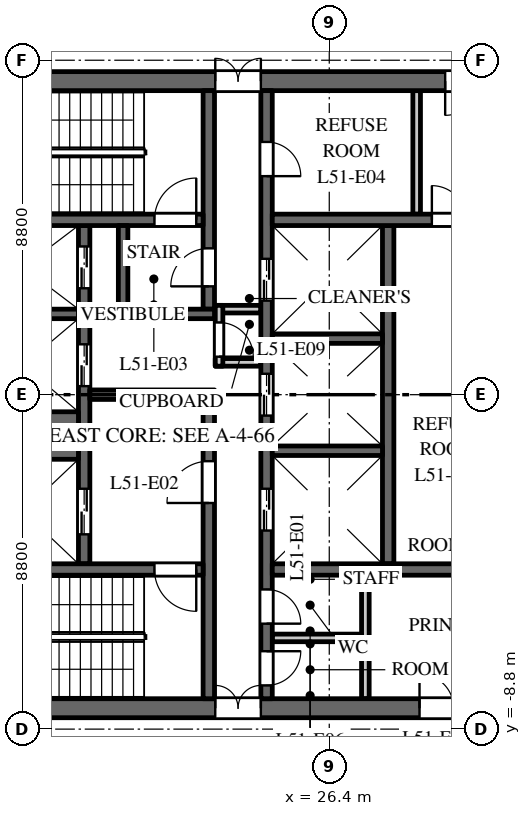
"""IFC4 building model, lengths in metres.
Left out: names, types, materials, properties, quantities, classifications, styles, units other than length and angle.
Written with IfcOpenShell. Run it as: python <this file> out.ifc"""

import sys

from ifc_helpers import new_model, si_unit, direction, frame, frame_2d, origin, place, context, subcontext, project, spatial, rectangle, extrude, element, fill, save


model = new_model("IFC4")
c1 = context("Model", 3, precision=1e-05, world=origin(), true_north=direction((0.0, 1.0)))
c2 = subcontext(c1, "Body", "Model", "MODEL_VIEW")
j1 = project(units=[si_unit("LENGTHUNIT", "METRE"), si_unit("PLANEANGLEUNIT", "RADIAN")], contexts=[c1])
p1 = place(None, origin())
s1 = spatial("IfcSite", under=j1, at=p1, CompositionType="ELEMENT")
p2 = place(p1, origin())
s2 = spatial("IfcBuilding", under=s1, at=p2, CompositionType="ELEMENT")
p3 = place(p2, frame((0.0, 0.0, 245.5)))
s3 = spatial("IfcBuildingStorey", under=s2, at=p3, CompositionType="ELEMENT", Elevation=245.5)
p4 = place(p3, frame((16.5, 8.25, 0.0), z_axis=(0.0, 0.0, 1.0), x_axis=(1.0, 0.0, 0.0)))
e1 = element("IfcWall", 1, at=p4, inside=s3, PredefinedType="SHEAR", context=c2, shape_type="SweptSolid", body=[
    extrude(rectangle(XDim=15.0, YDim=0.5, at=frame_2d((7.5, 0.0))), origin(), (0.0, 0.0, 1.0), 3.7),
])
p5 = place(p4, frame((6.9, 0.0, 0.0)))
e2 = element("IfcOpeningElement", 2, at=p5, cuts=e1, PredefinedType="OPENING", context=c2, shape_type="SweptSolid", body=[
    extrude(rectangle(XDim=1.2, YDim=2.1, at=frame_2d((0.6, 1.05))), frame((0.0, 0.26, 0.0), z_axis=(0.0, -1.0, 0.0), x_axis=(1.0, 0.0, 0.0)), (0.0, 0.0, 1.0), 0.52),
])
p6 = place(p4, frame((12.95, 0.0, 0.0)))
e3 = element("IfcOpeningElement", 3, at=p6, cuts=e1, PredefinedType="OPENING", context=c2, shape_type="SweptSolid", body=[
    extrude(rectangle(XDim=0.9, YDim=2.1, at=frame_2d((0.45, 1.05))), frame((0.0, 0.26, 0.0), z_axis=(0.0, -1.0, 0.0), x_axis=(1.0, 0.0, 0.0)), (0.0, 0.0, 1.0), 0.52),
])
p7 = place(p3, frame((16.5, -8.25, 0.0), z_axis=(0.0, 0.0, 1.0), x_axis=(1.0, 0.0, 0.0)))
e4 = element("IfcWall", 4, at=p7, inside=s3, PredefinedType="SHEAR", context=c2, shape_type="SweptSolid", body=[
    extrude(rectangle(XDim=15.0, YDim=0.5, at=frame_2d((7.5, 0.0))), origin(), (0.0, 0.0, 1.0), 3.7),
])
p8 = place(p7, frame((6.9, 0.0, 0.0)))
e5 = element("IfcOpeningElement", 5, at=p8, cuts=e4, PredefinedType="OPENING", context=c2, shape_type="SweptSolid", body=[
    extrude(rectangle(XDim=1.2, YDim=2.1, at=frame_2d((0.6, 1.05))), frame((0.0, 0.26, 0.0), z_axis=(0.0, -1.0, 0.0), x_axis=(1.0, 0.0, 0.0)), (0.0, 0.0, 1.0), 0.52),
])
p9 = place(p7, frame((12.275, 0.0, 0.0)))
e6 = element("IfcOpeningElement", 6, at=p9, cuts=e4, PredefinedType="OPENING", context=c2, shape_type="SweptSolid", body=[
    extrude(rectangle(XDim=0.9, YDim=2.1, at=frame_2d((0.45, 1.05))), frame((0.0, 0.26, 0.0), z_axis=(0.0, -1.0, 0.0), x_axis=(1.0, 0.0, 0.0)), (0.0, 0.0, 1.0), 0.52),
])
p10 = place(p3, frame((27.95, -4.45, 0.0), z_axis=(0.0, 0.0, 1.0), x_axis=(0.0, 1.0, 0.0)))
e7 = element("IfcWall", 7, at=p10, inside=s3, PredefinedType="SHEAR", context=c2, shape_type="SweptSolid", body=[
    extrude(rectangle(XDim=8.9, YDim=0.3, at=frame_2d((4.45, 0.0))), origin(), (0.0, 0.0, 1.0), 3.7),
])
p11 = place(p3, frame((19.95, -4.45, 0.0), z_axis=(0.0, 0.0, 1.0), x_axis=(0.0, 1.0, 0.0)))
e8 = element("IfcWall", 8, at=p11, inside=s3, PredefinedType="SHEAR", context=c2, shape_type="SweptSolid", body=[
    extrude(rectangle(XDim=8.9, YDim=0.3, at=frame_2d((4.45, 0.0))), origin(), (0.0, 0.0, 1.0), 3.7),
])
p12 = place(p11, frame((0.775, 0.0, 0.0)))
e9 = element("IfcOpeningElement", 9, at=p12, cuts=e8, PredefinedType="OPENING", context=c2, shape_type="SweptSolid", body=[
    extrude(rectangle(XDim=1.2, YDim=2.1, at=frame_2d((0.6, 1.05))), frame((0.0, 0.16, 0.0), z_axis=(0.0, -1.0, 0.0), x_axis=(1.0, 0.0, 0.0)), (0.0, 0.0, 1.0), 0.32),
])
p13 = place(p11, frame((4.675, 0.0, 0.0)))
e10 = element("IfcOpeningElement", 10, at=p13, cuts=e8, PredefinedType="OPENING", context=c2, shape_type="SweptSolid", body=[
    extrude(rectangle(XDim=1.1, YDim=2.1, at=frame_2d((0.55, 1.05))), frame((0.0, 0.16, 0.0), z_axis=(0.0, -1.0, 0.0), x_axis=(1.0, 0.0, 0.0)), (0.0, 0.0, 1.0), 0.32),
])
p14 = place(p11, frame((7.25, 0.0, 0.0)))
e11 = element("IfcOpeningElement", 11, at=p14, cuts=e8, PredefinedType="OPENING", context=c2, shape_type="SweptSolid", body=[
    extrude(rectangle(XDim=1.1, YDim=2.1, at=frame_2d((0.55, 1.05))), frame((0.0, 0.16, 0.0), z_axis=(0.0, -1.0, 0.0), x_axis=(1.0, 0.0, 0.0)), (0.0, 0.0, 1.0), 0.32),
])
p15 = place(p3, frame((24.75, -8.0, 0.0), z_axis=(0.0, 0.0, 1.0), x_axis=(0.0, 1.0, 0.0)))
e12 = element("IfcWall", 12, at=p15, inside=s3, PredefinedType="SHEAR", context=c2, shape_type="SweptSolid", body=[
    extrude(rectangle(XDim=16.0, YDim=0.3, at=frame_2d((8.0, 0.0))), origin(), (0.0, 0.0, 1.0), 3.7),
])
p16 = place(p15, frame((4.425, 0.0, 0.0)))
e13 = element("IfcOpeningElement", 13, at=p16, cuts=e12, PredefinedType="OPENING", context=c2, shape_type="SweptSolid", body=[
    extrude(rectangle(XDim=1.1, YDim=2.1, at=frame_2d((0.55, 1.05))), frame((0.0, 0.16, 0.0), z_axis=(0.0, -1.0, 0.0), x_axis=(1.0, 0.0, 0.0)), (0.0, 0.0, 1.0), 0.32),
])
p17 = place(p15, frame((7.45, 0.0, 0.0)))
e14 = element("IfcOpeningElement", 14, at=p17, cuts=e12, PredefinedType="OPENING", context=c2, shape_type="SweptSolid", body=[
    extrude(rectangle(XDim=1.1, YDim=2.1, at=frame_2d((0.55, 1.05))), frame((0.0, 0.16, 0.0), z_axis=(0.0, -1.0, 0.0), x_axis=(1.0, 0.0, 0.0)), (0.0, 0.0, 1.0), 0.32),
])
p18 = place(p15, frame((10.475, 0.0, 0.0)))
e15 = element("IfcOpeningElement", 15, at=p18, cuts=e12, PredefinedType="OPENING", context=c2, shape_type="SweptSolid", body=[
    extrude(rectangle(XDim=1.1, YDim=2.1, at=frame_2d((0.55, 1.05))), frame((0.0, 0.16, 0.0), z_axis=(0.0, -1.0, 0.0), x_axis=(1.0, 0.0, 0.0)), (0.0, 0.0, 1.0), 0.32),
])
p19 = place(p15, frame((13.75, 0.0, 0.0)))
e16 = element("IfcOpeningElement", 16, at=p19, cuts=e12, PredefinedType="OPENING", context=c2, shape_type="SweptSolid", body=[
    extrude(rectangle(XDim=0.9, YDim=2.1, at=frame_2d((0.45, 1.05))), frame((0.0, 0.16, 0.0), z_axis=(0.0, -1.0, 0.0), x_axis=(1.0, 0.0, 0.0)), (0.0, 0.0, 1.0), 0.32),
])
p20 = place(p15, frame((1.975, 0.0, 0.0)))
e17 = element("IfcOpeningElement", 17, at=p20, cuts=e12, PredefinedType="OPENING", context=c2, shape_type="SweptSolid", body=[
    extrude(rectangle(XDim=0.9, YDim=2.1, at=frame_2d((0.45, 1.05))), frame((0.0, 0.16, 0.0), z_axis=(0.0, -1.0, 0.0), x_axis=(1.0, 0.0, 0.0)), (0.0, 0.0, 1.0), 0.32),
])
p21 = place(p15, frame((0.35, 0.0, 0.0)))
e18 = element("IfcOpeningElement", 18, at=p21, cuts=e12, PredefinedType="OPENING", context=c2, shape_type="SweptSolid", body=[
    extrude(rectangle(XDim=0.9, YDim=2.1, at=frame_2d((0.45, 1.05))), frame((0.0, 0.16, 0.0), z_axis=(0.0, -1.0, 0.0), x_axis=(1.0, 0.0, 0.0)), (0.0, 0.0, 1.0), 0.32),
])
p22 = place(p3, frame((20.1, 0.0, 0.0), z_axis=(0.0, 0.0, 1.0), x_axis=(1.0, 0.0, 0.0)))
e19 = element("IfcWall", 19, at=p22, inside=s3, PredefinedType="SHEAR", context=c2, shape_type="SweptSolid", body=[
    extrude(rectangle(XDim=3.28, YDim=0.25, at=frame_2d((1.64, 0.0))), origin(), (0.0, 0.0, 1.0), 3.7),
])
for number, where, z_axis, x_axis in (
    (20, (23.4, 0.85, 0.0), (0.0, 0.0, 1.0), (1.0, 0.0, 0.0)),
    (21, (23.4, 2.25, 0.0), (0.0, 0.0, 1.0), (1.0, 0.0, 0.0)),
):
    element("IfcWall", number, at=place(p3, frame(where, z_axis=z_axis, x_axis=x_axis)), inside=s3, PredefinedType="PARTITIONING", context=c2, shape_type="SweptSolid", body=[
        extrude(rectangle(XDim=1.2, YDim=0.2, at=frame_2d((0.6, 0.0))), origin(), (0.0, 0.0, 1.0), 3.7),
    ])
p23 = place(p3, frame((23.5, 0.75, 0.0), z_axis=(0.0, 0.0, 1.0), x_axis=(0.0, 1.0, 0.0)))
e22 = element("IfcWall", 22, at=p23, inside=s3, PredefinedType="PARTITIONING", context=c2, shape_type="SweptSolid", body=[
    extrude(rectangle(XDim=1.6, YDim=0.2, at=frame_2d((0.8, 0.0))), origin(), (0.0, 0.0, 1.0), 3.7),
])
p24 = place(p23, frame((0.25, 0.0, 0.0)))
e23 = element("IfcOpeningElement", 23, at=p24, cuts=e22, PredefinedType="OPENING", context=c2, shape_type="SweptSolid", body=[
    extrude(rectangle(XDim=0.9, YDim=2.1, at=frame_2d((0.45, 1.05))), frame((0.0, 0.11, 0.0), z_axis=(0.0, -1.0, 0.0), x_axis=(1.0, 0.0, 0.0)), (0.0, 0.0, 1.0), 0.22),
])
p25 = place(p3, frame((24.9, 4.6, 0.0), z_axis=(0.0, 0.0, 1.0), x_axis=(1.0, 0.0, 0.0)))
e24 = element("IfcWall", 24, at=p25, inside=s3, PredefinedType="SHEAR", context=c2, shape_type="SweptSolid", body=[
    extrude(rectangle(XDim=6.1, YDim=0.3, at=frame_2d((3.05, 0.0))), origin(), (0.0, 0.0, 1.0), 3.7),
])
p26 = place(p25, frame((4.2, 0.0, 0.0)))
e25 = element("IfcOpeningElement", 25, at=p26, cuts=e24, PredefinedType="OPENING", context=c2, shape_type="SweptSolid", body=[
    extrude(rectangle(XDim=0.9, YDim=2.1, at=frame_2d((0.45, 1.05))), frame((0.0, 0.16, 0.0), z_axis=(0.0, -1.0, 0.0), x_axis=(1.0, 0.0, 0.0)), (0.0, 0.0, 1.0), 0.32),
])
for number, where, z_axis, x_axis in (
    (26, (28.7, 4.75, 0.0), (0.0, 0.0, 1.0), (0.0, 1.0, 0.0)),
    (27, (27.35, -8.0, 0.0), (0.0, 0.0, 1.0), (0.0, 1.0, 0.0)),
):
    element("IfcWall", number, at=place(p3, frame(where, z_axis=z_axis, x_axis=x_axis)), inside=s3, PredefinedType="PARTITIONING", context=c2, shape_type="SweptSolid", body=[
        extrude(rectangle(XDim=3.25, YDim=0.2, at=frame_2d((1.625, 0.0))), origin(), (0.0, 0.0, 1.0), 3.7),
    ])
p27 = place(p3, frame((24.9, -6.4, 0.0), z_axis=(0.0, 0.0, 1.0), x_axis=(1.0, 0.0, 0.0)))
e28 = element("IfcWall", 28, at=p27, inside=s3, PredefinedType="PARTITIONING", context=c2, shape_type="SweptSolid", body=[
    extrude(rectangle(XDim=2.35, YDim=0.2, at=frame_2d((1.175, 0.0))), origin(), (0.0, 0.0, 1.0), 3.7),
])
p28 = place(p3, frame((24.9, -4.6, 0.0), z_axis=(0.0, 0.0, 1.0), x_axis=(1.0, 0.0, 0.0)))
e29 = element("IfcWall", 29, at=p28, inside=s3, PredefinedType="SHEAR", context=c2, shape_type="SweptSolid", body=[
    extrude(rectangle(XDim=6.1, YDim=0.3, at=frame_2d((3.05, 0.0))), origin(), (0.0, 0.0, 1.0), 3.7),
])
p29 = place(p3, frame((16.9, -1.075, 0.0), z_axis=(0.0, 0.0, 1.0), x_axis=(1.0, 0.0, 0.0)))
e30 = element("IfcWall", 30, at=p29, inside=s3, PredefinedType="SHEAR", context=c2, shape_type="SweptSolid", body=[
    extrude(rectangle(XDim=2.9, YDim=1.25, at=frame_2d((1.45, 0.0))), origin(), (0.0, 0.0, 1.0), 3.7),
])
for number, where, z_axis, x_axis in (
    (31, (16.9, 2.125, 0.0), (0.0, 0.0, 1.0), (1.0, 0.0, 0.0)),
    (32, (24.9, -1.475, 0.0), (0.0, 0.0, 1.0), (1.0, 0.0, 0.0)),
    (33, (24.9, 1.475, 0.0), (0.0, 0.0, 1.0), (1.0, 0.0, 0.0)),
):
    element("IfcWall", number, at=place(p3, frame(where, z_axis=z_axis, x_axis=x_axis)), inside=s3, PredefinedType="SHEAR", context=c2, shape_type="SweptSolid", body=[
        extrude(rectangle(XDim=2.9, YDim=0.25, at=frame_2d((1.45, 0.0))), origin(), (0.0, 0.0, 1.0), 3.7),
    ])
p30 = place(p3, frame((23.23, 2.25, 0.0), z_axis=(0.0, 0.0, 1.0), x_axis=(0.0, 1.0, 0.0)))
e34 = element("IfcWall", 34, at=p30, inside=s3, PredefinedType="SHEAR", context=c2, shape_type="SweptSolid", body=[
    extrude(rectangle(XDim=5.75, YDim=0.3, at=frame_2d((2.875, 0.0))), origin(), (0.0, 0.0, 1.0), 3.7),
])
p31 = place(p30, frame((0.6, 0.0, 0.0)))
e35 = element("IfcOpeningElement", 35, at=p31, cuts=e34, PredefinedType="OPENING", context=c2, shape_type="SweptSolid", body=[
    extrude(rectangle(XDim=1.0, YDim=2.1, at=frame_2d((0.5, 1.05))), frame((0.0, 0.16, 0.0), z_axis=(0.0, -1.0, 0.0), x_axis=(1.0, 0.0, 0.0)), (0.0, 0.0, 1.0), 0.32),
])
p32 = place(p3, frame((23.23, -8.0, 0.0), z_axis=(0.0, 0.0, 1.0), x_axis=(0.0, 1.0, 0.0)))
e36 = element("IfcWall", 36, at=p32, inside=s3, PredefinedType="SHEAR", context=c2, shape_type="SweptSolid", body=[
    extrude(rectangle(XDim=7.875, YDim=0.3, at=frame_2d((3.938, 0.0))), origin(), (0.0, 0.0, 1.0), 3.7),
])
p33 = place(p32, frame((5.15, 0.0, 0.0)))
e37 = element("IfcOpeningElement", 37, at=p33, cuts=e36, PredefinedType="OPENING", context=c2, shape_type="SweptSolid", body=[
    extrude(rectangle(XDim=1.1, YDim=2.1, at=frame_2d((0.55, 1.05))), frame((0.0, 0.16, 0.0), z_axis=(0.0, -1.0, 0.0), x_axis=(1.0, 0.0, 0.0)), (0.0, 0.0, 1.0), 0.32),
])
p34 = place(p3, frame((16.9, 4.6, 0.0), z_axis=(0.0, 0.0, 1.0), x_axis=(1.0, 0.0, 0.0)))
e38 = element("IfcWall", 38, at=p34, inside=s3, PredefinedType="SHEAR", context=c2, shape_type="SweptSolid", body=[
    extrude(rectangle(XDim=6.18, YDim=0.3, at=frame_2d((3.09, 0.0))), origin(), (0.0, 0.0, 1.0), 3.7),
])
p35 = place(p34, frame((4.9, 0.0, 0.0)))
e39 = element("IfcOpeningElement", 39, at=p35, cuts=e38, PredefinedType="OPENING", context=c2, shape_type="SweptSolid", body=[
    extrude(rectangle(XDim=1.1, YDim=2.1, at=frame_2d((0.55, 1.05))), frame((0.0, 0.16, 0.0), z_axis=(0.0, -1.0, 0.0), x_axis=(1.0, 0.0, 0.0)), (0.0, 0.0, 1.0), 0.32),
])
p36 = place(p3, frame((16.9, -4.6, 0.0), z_axis=(0.0, 0.0, 1.0), x_axis=(1.0, 0.0, 0.0)))
e40 = element("IfcWall", 40, at=p36, inside=s3, PredefinedType="SHEAR", context=c2, shape_type="SweptSolid", body=[
    extrude(rectangle(XDim=6.18, YDim=0.3, at=frame_2d((3.09, 0.0))), origin(), (0.0, 0.0, 1.0), 3.7),
])
p37 = place(p36, frame((4.9, 0.0, 0.0)))
e41 = element("IfcOpeningElement", 41, at=p37, cuts=e40, PredefinedType="OPENING", context=c2, shape_type="SweptSolid", body=[
    extrude(rectangle(XDim=1.1, YDim=2.1, at=frame_2d((0.55, 1.05))), frame((0.0, 0.16, 0.0), z_axis=(0.0, -1.0, 0.0), x_axis=(1.0, 0.0, 0.0)), (0.0, 0.0, 1.0), 0.32),
])
p38 = place(p3, frame((20.85, 2.125, 0.0), z_axis=(0.0, 0.0, 1.0), x_axis=(1.0, 0.0, 0.0)))
e42 = element("IfcWall", 42, at=p38, inside=s3, PredefinedType="SHEAR", context=c2, shape_type="SweptSolid", body=[
    extrude(rectangle(XDim=2.53, YDim=0.25, at=frame_2d((1.265, 0.0))), origin(), (0.0, 0.0, 1.0), 3.7),
])
p39 = place(p3, frame((20.975, 2.25, 0.0), z_axis=(0.0, 0.0, 1.0), x_axis=(0.0, 1.0, 0.0)))
e43 = element("IfcWall", 43, at=p39, inside=s3, PredefinedType="SHEAR", context=c2, shape_type="SweptSolid", body=[
    extrude(rectangle(XDim=2.2, YDim=0.25, at=frame_2d((1.1, 0.0))), origin(), (0.0, 0.0, 1.0), 3.7),
])
p40 = place(p12, origin())
e44 = element("IfcDoor", 44, at=p40, inside=s3, OperationType="DOUBLE_DOOR_SLIDING", PredefinedType="DOOR", context=c2, shape_type="SweptSolid", body=[
    extrude(rectangle(XDim=1.2, YDim=2.1, at=frame_2d((0.6, 1.05))), frame((0.0, 0.025, 0.0), z_axis=(0.0, -1.0, 0.0), x_axis=(1.0, 0.0, 0.0)), (0.0, 0.0, 1.0), 0.05),
])
fill(e9, e44)
p41 = place(p13, origin())
e45 = element("IfcDoor", 45, at=p41, inside=s3, OperationType="DOUBLE_DOOR_SLIDING", PredefinedType="DOOR", context=c2, shape_type="SweptSolid", body=[
    extrude(rectangle(XDim=1.1, YDim=2.1, at=frame_2d((0.55, 1.05))), frame((0.0, 0.025, 0.0), z_axis=(0.0, -1.0, 0.0), x_axis=(1.0, 0.0, 0.0)), (0.0, 0.0, 1.0), 0.05),
])
fill(e10, e45)
p42 = place(p14, origin())
e46 = element("IfcDoor", 46, at=p42, inside=s3, OperationType="DOUBLE_DOOR_SLIDING", PredefinedType="DOOR", context=c2, shape_type="SweptSolid", body=[
    extrude(rectangle(XDim=1.1, YDim=2.1, at=frame_2d((0.55, 1.05))), frame((0.0, 0.025, 0.0), z_axis=(0.0, -1.0, 0.0), x_axis=(1.0, 0.0, 0.0)), (0.0, 0.0, 1.0), 0.05),
])
fill(e11, e46)
p43 = place(p16, origin())
e47 = element("IfcDoor", 47, at=p43, inside=s3, OperationType="DOUBLE_DOOR_SLIDING", PredefinedType="DOOR", context=c2, shape_type="SweptSolid", body=[
    extrude(rectangle(XDim=1.1, YDim=2.1, at=frame_2d((0.55, 1.05))), frame((0.0, 0.025, 0.0), z_axis=(0.0, -1.0, 0.0), x_axis=(1.0, 0.0, 0.0)), (0.0, 0.0, 1.0), 0.05),
])
fill(e13, e47)
p44 = place(p17, origin())
e48 = element("IfcDoor", 48, at=p44, inside=s3, OperationType="DOUBLE_DOOR_SLIDING", PredefinedType="DOOR", context=c2, shape_type="SweptSolid", body=[
    extrude(rectangle(XDim=1.1, YDim=2.1, at=frame_2d((0.55, 1.05))), frame((0.0, 0.025, 0.0), z_axis=(0.0, -1.0, 0.0), x_axis=(1.0, 0.0, 0.0)), (0.0, 0.0, 1.0), 0.05),
])
fill(e14, e48)
p45 = place(p18, origin())
e49 = element("IfcDoor", 49, at=p45, inside=s3, OperationType="DOUBLE_DOOR_SLIDING", PredefinedType="DOOR", context=c2, shape_type="SweptSolid", body=[
    extrude(rectangle(XDim=1.1, YDim=2.1, at=frame_2d((0.55, 1.05))), frame((0.0, 0.025, 0.0), z_axis=(0.0, -1.0, 0.0), x_axis=(1.0, 0.0, 0.0)), (0.0, 0.0, 1.0), 0.05),
])
fill(e15, e49)
p46 = place(p35, origin())
e50 = element("IfcDoor", 50, at=p46, inside=s3, OperationType="SINGLE_SWING_LEFT", PredefinedType="DOOR", context=c2, shape_type="SweptSolid", body=[
    extrude(rectangle(XDim=1.1, YDim=2.1, at=frame_2d((0.55, 1.05))), frame((0.0, 0.025, 0.0), z_axis=(0.0, -1.0, 0.0), x_axis=(1.0, 0.0, 0.0)), (0.0, 0.0, 1.0), 0.05),
])
fill(e39, e50)
p47 = place(p37, origin())
e51 = element("IfcDoor", 51, at=p47, inside=s3, OperationType="SINGLE_SWING_RIGHT", PredefinedType="DOOR", context=c2, shape_type="SweptSolid", body=[
    extrude(rectangle(XDim=1.1, YDim=2.1, at=frame_2d((0.55, 1.05))), frame((0.0, 0.025, 0.0), z_axis=(0.0, -1.0, 0.0), x_axis=(1.0, 0.0, 0.0)), (0.0, 0.0, 1.0), 0.05),
])
fill(e41, e51)
p48 = place(p33, origin())
e52 = element("IfcDoor", 52, at=p48, inside=s3, OperationType="SINGLE_SWING_RIGHT", PredefinedType="DOOR", context=c2, shape_type="SweptSolid", body=[
    extrude(rectangle(XDim=1.1, YDim=2.1, at=frame_2d((0.55, 1.05))), frame((0.0, 0.025, 0.0), z_axis=(0.0, -1.0, 0.0), x_axis=(1.0, 0.0, 0.0)), (0.0, 0.0, 1.0), 0.05),
])
fill(e37, e52)
p49 = place(p31, origin())
e53 = element("IfcDoor", 53, at=p49, inside=s3, OperationType="SINGLE_SWING_RIGHT", PredefinedType="DOOR", context=c2, shape_type="SweptSolid", body=[
    extrude(rectangle(XDim=1.0, YDim=2.1, at=frame_2d((0.5, 1.05))), frame((0.0, 0.025, 0.0), z_axis=(0.0, -1.0, 0.0), x_axis=(1.0, 0.0, 0.0)), (0.0, 0.0, 1.0), 0.05),
])
fill(e35, e53)
p50 = place(p5, origin())
e54 = element("IfcDoor", 54, at=p50, inside=s3, OperationType="DOUBLE_DOOR_DOUBLE_SWING", PredefinedType="DOOR", context=c2, shape_type="SweptSolid", body=[
    extrude(rectangle(XDim=1.2, YDim=2.1, at=frame_2d((0.6, 1.05))), frame((0.0, 0.025, 0.0), z_axis=(0.0, -1.0, 0.0), x_axis=(1.0, 0.0, 0.0)), (0.0, 0.0, 1.0), 0.05),
])
fill(e2, e54)
p51 = place(p8, origin())
e55 = element("IfcDoor", 55, at=p51, inside=s3, OperationType="DOUBLE_DOOR_DOUBLE_SWING", PredefinedType="DOOR", context=c2, shape_type="SweptSolid", body=[
    extrude(rectangle(XDim=1.2, YDim=2.1, at=frame_2d((0.6, 1.05))), frame((0.0, 0.025, 0.0), z_axis=(0.0, -1.0, 0.0), x_axis=(1.0, 0.0, 0.0)), (0.0, 0.0, 1.0), 0.05),
])
fill(e5, e55)
p52 = place(p19, origin())
e56 = element("IfcDoor", 56, at=p52, inside=s3, OperationType="SINGLE_SWING_LEFT", PredefinedType="DOOR", context=c2, shape_type="SweptSolid", body=[
    extrude(rectangle(XDim=0.9, YDim=2.1, at=frame_2d((0.45, 1.05))), frame((0.0, 0.025, 0.0), z_axis=(0.0, -1.0, 0.0), x_axis=(1.0, 0.0, 0.0)), (0.0, 0.0, 1.0), 0.05),
])
fill(e16, e56)
p53 = place(p6, origin())
e57 = element("IfcDoor", 57, at=p53, inside=s3, OperationType="SINGLE_SWING_LEFT", PredefinedType="DOOR", context=c2, shape_type="SweptSolid", body=[
    extrude(rectangle(XDim=0.9, YDim=2.1, at=frame_2d((0.45, 1.05))), frame((0.0, 0.025, 0.0), z_axis=(0.0, -1.0, 0.0), x_axis=(1.0, 0.0, 0.0)), (0.0, 0.0, 1.0), 0.05),
])
fill(e3, e57)
p54 = place(p20, origin())
e58 = element("IfcDoor", 58, at=p54, inside=s3, OperationType="SINGLE_SWING_LEFT", PredefinedType="DOOR", context=c2, shape_type="SweptSolid", body=[
    extrude(rectangle(XDim=0.9, YDim=2.1, at=frame_2d((0.45, 1.05))), frame((0.0, 0.025, 0.0), z_axis=(0.0, -1.0, 0.0), x_axis=(1.0, 0.0, 0.0)), (0.0, 0.0, 1.0), 0.05),
])
fill(e17, e58)
p55 = place(p21, origin())
e59 = element("IfcDoor", 59, at=p55, inside=s3, OperationType="SINGLE_SWING_RIGHT", PredefinedType="DOOR", context=c2, shape_type="SweptSolid", body=[
    extrude(rectangle(XDim=0.9, YDim=2.1, at=frame_2d((0.45, 1.05))), frame((0.0, 0.025, 0.0), z_axis=(0.0, -1.0, 0.0), x_axis=(1.0, 0.0, 0.0)), (0.0, 0.0, 1.0), 0.05),
])
fill(e18, e59)
p56 = place(p9, origin())
e60 = element("IfcDoor", 60, at=p56, inside=s3, OperationType="SINGLE_SWING_RIGHT", PredefinedType="DOOR", context=c2, shape_type="SweptSolid", body=[
    extrude(rectangle(XDim=0.9, YDim=2.1, at=frame_2d((0.45, 1.05))), frame((0.0, 0.025, 0.0), z_axis=(0.0, -1.0, 0.0), x_axis=(1.0, 0.0, 0.0)), (0.0, 0.0, 1.0), 0.05),
])
fill(e6, e60)
p57 = place(p24, origin())
e61 = element("IfcDoor", 61, at=p57, inside=s3, OperationType="SINGLE_SWING_LEFT", PredefinedType="DOOR", context=c2, shape_type="SweptSolid", body=[
    extrude(rectangle(XDim=0.9, YDim=2.1, at=frame_2d((0.45, 1.05))), frame((0.0, 0.025, 0.0), z_axis=(0.0, -1.0, 0.0), x_axis=(1.0, 0.0, 0.0)), (0.0, 0.0, 1.0), 0.05),
])
fill(e23, e61)
p58 = place(p26, origin())
e62 = element("IfcDoor", 62, at=p58, inside=s3, OperationType="SINGLE_SWING_RIGHT", PredefinedType="DOOR", context=c2, shape_type="SweptSolid", body=[
    extrude(rectangle(XDim=0.9, YDim=2.1, at=frame_2d((0.45, 1.05))), frame((0.0, 0.025, 0.0), z_axis=(0.0, -1.0, 0.0), x_axis=(1.0, 0.0, 0.0)), (0.0, 0.0, 1.0), 0.05),
])
fill(e25, e62)
save(model, sys.argv[1])
